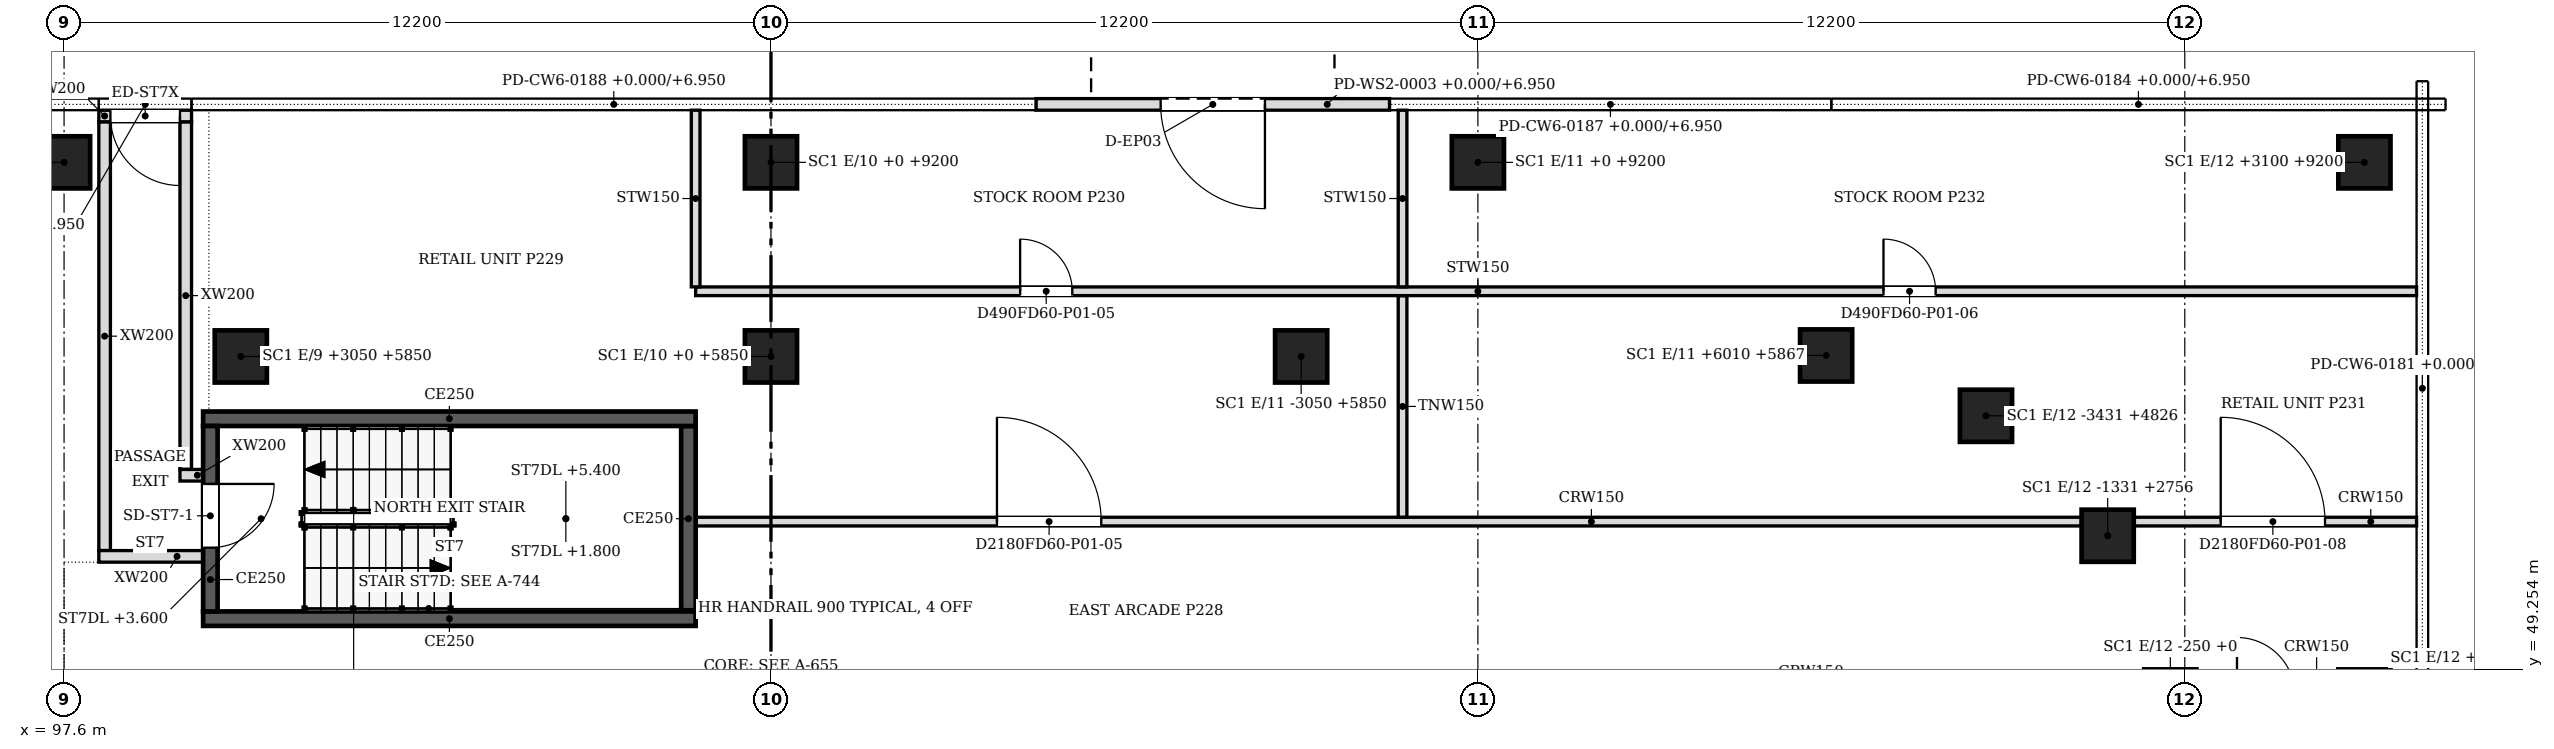
"""IFC4 building model, lengths in metres.
Left out: names, types, materials, properties, quantities, classifications, styles, units other than length and angle.
Written with IfcOpenShell. Run it as: python <this file> out.ifc"""

import sys

from ifc_helpers import new_model, si_unit, direction, frame, frame_2d, origin, origin_2d, place, context, subcontext, project, spatial, polyline, rectangle, outline, extrude, source, transform, mapped, element, fill, save


model = new_model("IFC4")
c1 = context("Model", 3, precision=1e-05, world=origin(), true_north=direction((0.0, 1.0)))
c2 = subcontext(c1, "Body", "Model", "MODEL_VIEW")
j1 = project(units=[si_unit("LENGTHUNIT", "METRE"), si_unit("PLANEANGLEUNIT", "RADIAN")], contexts=[c1])
p1 = place(None, origin())
s1 = spatial("IfcSite", under=j1, at=p1, CompositionType="ELEMENT")
p2 = place(p1, origin())
s2 = spatial("IfcBuilding", under=s1, at=p2, CompositionType="ELEMENT")
p3 = place(p2, origin())
s3 = spatial("IfcBuildingStorey", under=s2, at=p3, CompositionType="ELEMENT", Elevation=0.0)
for number, where, z_axis, x_axis in (
    (1, (132.869, 51.556, 0.0), (0.0, 0.0, 1.0), (1.0, 0.0, 0.0)),
    (2, (130.769, 53.626, 0.0), (0.0, 0.0, 1.0), (1.0, 0.0, 0.0)),
    (3, (128.01, 54.667, 0.0), (0.0, 0.0, 1.0), (1.0, 0.0, 0.0)),
    (4, (118.95, 54.65, 0.0), (0.0, 0.0, 1.0), (1.0, 0.0, 0.0)),
    (5, (109.8, 54.65, 0.0), (0.0, 0.0, 1.0), (1.0, 0.0, 0.0)),
    (6, (100.65, 54.65, 0.0), (0.0, 0.0, 1.0), (1.0, 0.0, 0.0)),
    (7, (97.6, 58.0, 0.0), (0.0, 0.0, 1.0), (1.0, 0.0, 0.0)),
    (8, (109.8, 58.0, 0.0), (0.0, 0.0, 1.0), (1.0, 0.0, 0.0)),
    (9, (122.0, 58.0, 0.0), (0.0, 0.0, 1.0), (1.0, 0.0, 0.0)),
    (10, (137.3, 58.0, 0.0), (0.0, 0.0, 1.0), (1.0, 0.0, 0.0)),
):
    element("IfcColumn", number, at=place(p3, frame(where, z_axis=z_axis, x_axis=x_axis)), inside=s3, PredefinedType="COLUMN", context=c2, shape_type="SweptSolid", body=[
        extrude(rectangle(XDim=0.9, YDim=0.9, at=origin_2d()), origin(), (0.0, 0.0, 1.0), 6.95),
    ])
p4 = place(p3, frame((120.475, 59.0, 0.0), z_axis=(0.0, 0.0, 1.0), x_axis=(-1.0, 0.0, 0.0)))
e11 = element("IfcWall", 11, at=p4, inside=s3, PredefinedType="PARTITIONING", context=c2, shape_type="SweptSolid", body=[
    extrude(rectangle(XDim=6.1, YDim=0.2, at=frame_2d((3.05, 0.0))), origin(), (0.0, 0.0, 1.0), 6.95),
])
m1 = source(origin(), c2, "Body", "SweptSolid", [
    extrude(rectangle(XDim=1.8, YDim=3.0, at=frame_2d((0.9, 1.5))), frame((0.0, 0.11, 0.0), z_axis=(0.0, -1.0, 0.0), x_axis=(1.0, 0.0, 0.0)), (0.0, 0.0, 1.0), 0.22),
])
p5 = place(p4, frame((2.15, 0.0, 0.0)))
e12 = element("IfcOpeningElement", 12, at=p5, cuts=e11, PredefinedType="OPENING", context=c2, shape_type="MappedRepresentation", body=[
    mapped(m1, transform((0.0, 0.0, 0.0), scale=1.0)),
])
m2 = source(origin(), c2, "Body", "SweptSolid", [
    extrude(outline(polyline([(0.12, 0.1), (2.03, 0.1), (2.03, 6.85), (0.12, 6.85), (0.12, 0.1)])), frame((0.0, 0.11, 0.0), z_axis=(0.0, -1.0, 0.0), x_axis=(1.0, 0.0, 0.0)), (0.0, 0.0, 1.0), 0.22),
])
p6 = place(p4, origin())
e13 = element("IfcOpeningElement", 13, at=p6, cuts=e11, PredefinedType="OPENING", context=c2, shape_type="MappedRepresentation", body=[
    mapped(m2, transform((0.0, 0.0, 0.0), scale=1.0)),
])
m3 = source(origin(), c2, "Body", "SweptSolid", [
    extrude(outline(polyline([(4.07, 0.1), (5.98, 0.1), (5.98, 6.85), (4.07, 6.85), (4.07, 0.1)])), frame((0.0, 0.11, 0.0), z_axis=(0.0, -1.0, 0.0), x_axis=(1.0, 0.0, 0.0)), (0.0, 0.0, 1.0), 0.22),
])
p7 = place(p4, origin())
e14 = element("IfcOpeningElement", 14, at=p7, cuts=e11, PredefinedType="OPENING", context=c2, shape_type="MappedRepresentation", body=[
    mapped(m3, transform((0.0, 0.0, 0.0), scale=1.0)),
])
m4 = source(origin(), c2, "Body", "SweptSolid", [
    extrude(outline(polyline([(2.15, 3.12), (3.95, 3.12), (3.95, 6.85), (2.15, 6.85), (2.15, 3.12)])), frame((0.0, 0.11, 0.0), z_axis=(0.0, -1.0, 0.0), x_axis=(1.0, 0.0, 0.0)), (0.0, 0.0, 1.0), 0.22),
])
p8 = place(p4, origin())
e15 = element("IfcOpeningElement", 15, at=p8, cuts=e11, PredefinedType="OPENING", context=c2, shape_type="MappedRepresentation", body=[
    mapped(m4, transform((0.0, 0.0, 0.0), scale=1.0)),
])
p9 = place(p3, frame((108.5, 50.125, 0.0), z_axis=(0.0, 0.0, 1.0), x_axis=(-1.0, 0.0, 0.0)))
e16 = element("IfcWall", 16, at=p9, inside=s3, PredefinedType="SOLIDWALL", context=c2, shape_type="SweptSolid", body=[
    extrude(rectangle(XDim=8.5, YDim=0.25, at=frame_2d((4.25, 0.0))), origin(), (0.0, 0.0, 1.0), 7.2),
])
p10 = place(p3, frame((100.125, 50.25, 0.0), z_axis=(0.0, 0.0, 1.0), x_axis=(0.0, 1.0, 0.0)))
e17 = element("IfcWall", 17, at=p10, inside=s3, PredefinedType="SOLIDWALL", context=c2, shape_type="SweptSolid", body=[
    extrude(rectangle(XDim=3.2, YDim=0.25, at=frame_2d((1.6, 0.0))), origin(), (0.0, 0.0, 1.0), 7.2),
])
m5 = source(origin(), c2, "Body", "SweptSolid", [
    extrude(rectangle(XDim=1.1, YDim=2.1, at=frame_2d((0.55, 1.05))), frame((0.0, 0.135, 0.0), z_axis=(0.0, -1.0, 0.0), x_axis=(1.0, 0.0, 0.0)), (0.0, 0.0, 1.0), 0.27),
])
p11 = place(p10, frame((1.1, 0.0, 0.0)))
e18 = element("IfcOpeningElement", 18, at=p11, cuts=e17, PredefinedType="OPENING", context=c2, shape_type="MappedRepresentation", body=[
    mapped(m5, transform((0.0, 0.0, 0.0), scale=1.0)),
])
p12 = place(p3, frame((100.0, 53.575, 0.0), z_axis=(0.0, 0.0, 1.0), x_axis=(1.0, 0.0, 0.0)))
e19 = element("IfcWall", 19, at=p12, inside=s3, PredefinedType="SOLIDWALL", context=c2, shape_type="SweptSolid", body=[
    extrude(rectangle(XDim=8.5, YDim=0.25, at=frame_2d((4.25, 0.0))), origin(), (0.0, 0.0, 1.0), 7.2),
])
p13 = place(p3, frame((108.375, 53.45, 0.0), z_axis=(0.0, 0.0, 1.0), x_axis=(0.0, -1.0, 0.0)))
e20 = element("IfcWall", 20, at=p13, inside=s3, PredefinedType="SOLIDWALL", context=c2, shape_type="SweptSolid", body=[
    extrude(rectangle(XDim=3.2, YDim=0.25, at=frame_2d((1.6, 0.0))), origin(), (0.0, 0.0, 1.0), 7.2),
])
p14 = place(p3, frame((98.2, 58.8, 0.0), z_axis=(0.0, 0.0, 1.0), x_axis=(1.0, 0.0, 0.0)))
e21 = element("IfcWall", 21, at=p14, inside=s3, PredefinedType="PARTITIONING", context=c2, shape_type="SweptSolid", body=[
    extrude(rectangle(XDim=1.6, YDim=0.2, at=frame_2d((0.8, 0.0))), origin(), (0.0, 0.0, 1.0), 6.115),
])
m6 = source(origin(), c2, "Body", "SweptSolid", [
    extrude(rectangle(XDim=1.2, YDim=2.1, at=frame_2d((0.6, 1.05))), frame((0.0, 0.11, 0.0), z_axis=(0.0, -1.0, 0.0), x_axis=(1.0, 0.0, 0.0)), (0.0, 0.0, 1.0), 0.22),
])
p15 = place(p14, frame((0.2, 0.0, 0.0)))
e22 = element("IfcOpeningElement", 22, at=p15, cuts=e21, PredefinedType="OPENING", context=c2, shape_type="MappedRepresentation", body=[
    mapped(m6, transform((0.0, 0.0, 0.0), scale=1.0)),
])
p16 = place(p3, frame((98.3, 51.3, 0.0), z_axis=(0.0, 0.0, 1.0), x_axis=(0.0, 1.0, 0.0)))
e23 = element("IfcWall", 23, at=p16, inside=s3, PredefinedType="PARTITIONING", context=c2, shape_type="SweptSolid", body=[
    extrude(rectangle(XDim=7.4, YDim=0.2, at=frame_2d((3.7, 0.0))), origin(), (0.0, 0.0, 1.0), 6.115),
])
p17 = place(p3, frame((98.2, 51.2, 0.0), z_axis=(0.0, 0.0, 1.0), x_axis=(1.0, 0.0, 0.0)))
e24 = element("IfcWall", 24, at=p17, inside=s3, PredefinedType="PARTITIONING", context=c2, shape_type="SweptSolid", body=[
    extrude(rectangle(XDim=1.8, YDim=0.2, at=frame_2d((0.9, 0.0))), origin(), (0.0, 0.0, 1.0), 6.115),
])
p18 = place(p3, frame((99.7, 52.7, 0.0), z_axis=(0.0, 0.0, 1.0), x_axis=(0.0, 1.0, 0.0)))
e25 = element("IfcWall", 25, at=p18, inside=s3, PredefinedType="PARTITIONING", context=c2, shape_type="SweptSolid", body=[
    extrude(rectangle(XDim=6.0, YDim=0.2, at=frame_2d((3.0, 0.0))), origin(), (0.0, 0.0, 1.0), 6.115),
])
p19 = place(p3, frame((99.6, 52.6, 0.0), z_axis=(0.0, 0.0, 1.0), x_axis=(1.0, 0.0, 0.0)))
e26 = element("IfcWall", 26, at=p19, inside=s3, PredefinedType="PARTITIONING", context=c2, shape_type="SweptSolid", body=[
    extrude(rectangle(XDim=0.4, YDim=0.2, at=frame_2d((0.2, 0.0))), origin(), (0.0, 0.0, 1.0), 6.115),
])
p20 = place(p3, frame((108.5, 51.8, 0.0), z_axis=(0.0, 0.0, 1.0), x_axis=(1.0, 0.0, 0.0)))
e27 = element("IfcWall", 27, at=p20, inside=s3, PredefinedType="PARTITIONING", context=c2, shape_type="SweptSolid", body=[
    extrude(rectangle(XDim=23.918, YDim=0.15, at=frame_2d((11.959, 0.0))), origin(), (0.0, 0.0, 1.0), 6.115),
])
m7 = source(origin(), c2, "Body", "SweptSolid", [
    extrude(rectangle(XDim=1.8, YDim=2.1, at=frame_2d((0.9, 1.05))), frame((0.0, 0.085, 0.0), z_axis=(0.0, -1.0, 0.0), x_axis=(1.0, 0.0, 0.0)), (0.0, 0.0, 1.0), 0.17),
])
p21 = place(p20, frame((5.2, 0.0, 0.0)))
e28 = element("IfcOpeningElement", 28, at=p21, cuts=e27, PredefinedType="OPENING", context=c2, shape_type="MappedRepresentation", body=[
    mapped(m7, transform((0.0, 0.0, 0.0), scale=1.0)),
])
p22 = place(p3, frame((133.32, 51.8, 0.0), z_axis=(0.0, 0.0, 1.0), x_axis=(1.0, 0.0, 0.0)))
e29 = element("IfcWall", 29, at=p22, inside=s3, PredefinedType="PARTITIONING", context=c2, shape_type="SweptSolid", body=[
    extrude(rectangle(XDim=4.88, YDim=0.15, at=frame_2d((2.44, 0.0))), origin(), (0.0, 0.0, 1.0), 6.115),
])
p23 = place(p22, frame((1.5, 0.0, 0.0)))
e30 = element("IfcOpeningElement", 30, at=p23, cuts=e29, PredefinedType="OPENING", context=c2, shape_type="MappedRepresentation", body=[
    mapped(m7, transform((0.0, 0.0, 0.0), scale=1.0)),
])
p24 = place(p3, frame((120.7, 51.876, 0.0), z_axis=(0.0, 0.0, 1.0), x_axis=(0.0, 1.0, 0.0)))
e31 = element("IfcWall", 31, at=p24, inside=s3, PredefinedType="PARTITIONING", context=c2, shape_type="SweptSolid", body=[
    extrude(rectangle(XDim=3.823, YDim=0.15, at=frame_2d((1.912, 0.0))), origin(), (0.0, 0.0, 1.0), 6.115),
])
p25 = place(p3, frame((108.5, 55.775, 0.0), z_axis=(0.0, 0.0, 1.0), x_axis=(1.0, 0.0, 0.0)))
e32 = element("IfcWall", 32, at=p25, inside=s3, PredefinedType="PARTITIONING", context=c2, shape_type="SweptSolid", body=[
    extrude(rectangle(XDim=29.7, YDim=0.15, at=frame_2d((14.85, 0.0))), origin(), (0.0, 0.0, 1.0), 6.115),
])
m8 = source(origin(), c2, "Body", "SweptSolid", [
    extrude(rectangle(XDim=0.9, YDim=2.1, at=frame_2d((0.45, 1.05))), frame((0.0, 0.085, 0.0), z_axis=(0.0, -1.0, 0.0), x_axis=(1.0, 0.0, 0.0)), (0.0, 0.0, 1.0), 0.17),
])
p26 = place(p25, frame((5.6, 0.0, 0.0)))
e33 = element("IfcOpeningElement", 33, at=p26, cuts=e32, PredefinedType="OPENING", context=c2, shape_type="MappedRepresentation", body=[
    mapped(m8, transform((0.0, 0.0, 0.0), scale=1.0)),
])
p27 = place(p25, frame((20.5, 0.0, 0.0)))
e34 = element("IfcOpeningElement", 34, at=p27, cuts=e32, PredefinedType="OPENING", context=c2, shape_type="MappedRepresentation", body=[
    mapped(m8, transform((0.0, 0.0, 0.0), scale=1.0)),
])
for number, where, z_axis, x_axis in (
    (35, (108.5, 55.851, 0.0), (0.0, 0.0, 1.0), (0.0, 1.0, 0.0)),
    (36, (120.7, 55.851, 0.0), (0.0, 0.0, 1.0), (0.0, 1.0, 0.0)),
):
    element("IfcWall", number, at=place(p3, frame(where, z_axis=z_axis, x_axis=x_axis)), inside=s3, PredefinedType="PARTITIONING", context=c2, shape_type="SweptSolid", body=[
        extrude(rectangle(XDim=3.049, YDim=0.15, at=frame_2d((1.524, 0.0))), origin(), (0.0, 0.0, 1.0), 6.115),
    ])
m9 = source(origin(), c2, "Body", "SweptSolid", [
    extrude(rectangle(XDim=1.8, YDim=3.0, at=frame_2d((0.9, 1.5))), frame((0.0, 0.025, 0.0), z_axis=(0.0, -1.0, 0.0), x_axis=(1.0, 0.0, 0.0)), (0.0, 0.0, 1.0), 0.05),
])
p28 = place(p5, origin())
e37 = element("IfcDoor", 37, at=p28, inside=s3, OperationType="DOUBLE_DOOR_SINGLE_SWING", PredefinedType="DOOR", context=c2, shape_type="MappedRepresentation", body=[
    mapped(m9, transform((0.0, 0.0, 0.0), scale=1.0)),
])
fill(e12, e37)
m10 = source(origin(), c2, "Body", "SweptSolid", [
    extrude(rectangle(XDim=1.1, YDim=2.1, at=frame_2d((0.55, 1.05))), frame((0.0, 0.025, 0.0), z_axis=(0.0, -1.0, 0.0), x_axis=(1.0, 0.0, 0.0)), (0.0, 0.0, 1.0), 0.05),
])
p29 = place(p11, origin())
e38 = element("IfcDoor", 38, at=p29, inside=s3, OperationType="SINGLE_SWING_RIGHT", PredefinedType="DOOR", context=c2, shape_type="MappedRepresentation", body=[
    mapped(m10, transform((0.0, 0.0, 0.0), scale=1.0)),
])
fill(e18, e38)
m11 = source(origin(), c2, "Body", "SweptSolid", [
    extrude(rectangle(XDim=1.2, YDim=2.1, at=frame_2d((0.6, 1.05))), frame((0.0, 0.025, 0.0), z_axis=(0.0, -1.0, 0.0), x_axis=(1.0, 0.0, 0.0)), (0.0, 0.0, 1.0), 0.05),
])
p30 = place(p15, origin())
e39 = element("IfcDoor", 39, at=p30, inside=s3, OperationType="SINGLE_SWING_RIGHT", PredefinedType="DOOR", context=c2, shape_type="MappedRepresentation", body=[
    mapped(m11, transform((0.0, 0.0, 0.0), scale=1.0)),
])
fill(e22, e39)
m12 = source(origin(), c2, "Body", "SweptSolid", [
    extrude(rectangle(XDim=1.8, YDim=2.1, at=frame_2d((0.9, 1.05))), frame((0.0, 0.025, 0.0), z_axis=(0.0, -1.0, 0.0), x_axis=(1.0, 0.0, 0.0)), (0.0, 0.0, 1.0), 0.05),
])
p31 = place(p21, origin())
e40 = element("IfcDoor", 40, at=p31, inside=s3, OperationType="DOUBLE_DOOR_SINGLE_SWING", PredefinedType="DOOR", context=c2, shape_type="MappedRepresentation", body=[
    mapped(m12, transform((0.0, 0.0, 0.0), scale=1.0)),
])
fill(e28, e40)
m13 = source(origin(), c2, "Body", "SweptSolid", [
    extrude(rectangle(XDim=0.9, YDim=2.1, at=frame_2d((0.45, 1.05))), frame((0.0, 0.025, 0.0), z_axis=(0.0, -1.0, 0.0), x_axis=(1.0, 0.0, 0.0)), (0.0, 0.0, 1.0), 0.05),
])
p32 = place(p26, origin())
e41 = element("IfcDoor", 41, at=p32, inside=s3, OperationType="SINGLE_SWING_LEFT", PredefinedType="DOOR", context=c2, shape_type="MappedRepresentation", body=[
    mapped(m13, transform((0.0, 0.0, 0.0), scale=1.0)),
])
fill(e33, e41)
p33 = place(p23, origin())
e42 = element("IfcDoor", 42, at=p33, inside=s3, OperationType="DOUBLE_DOOR_SINGLE_SWING", PredefinedType="DOOR", context=c2, shape_type="MappedRepresentation", body=[
    mapped(m12, transform((0.0, 0.0, 0.0), scale=1.0)),
])
fill(e30, e42)
p34 = place(p27, origin())
e43 = element("IfcDoor", 43, at=p34, inside=s3, OperationType="SINGLE_SWING_LEFT", PredefinedType="DOOR", context=c2, shape_type="MappedRepresentation", body=[
    mapped(m13, transform((0.0, 0.0, 0.0), scale=1.0)),
])
fill(e34, e43)
save(model, sys.argv[1])
